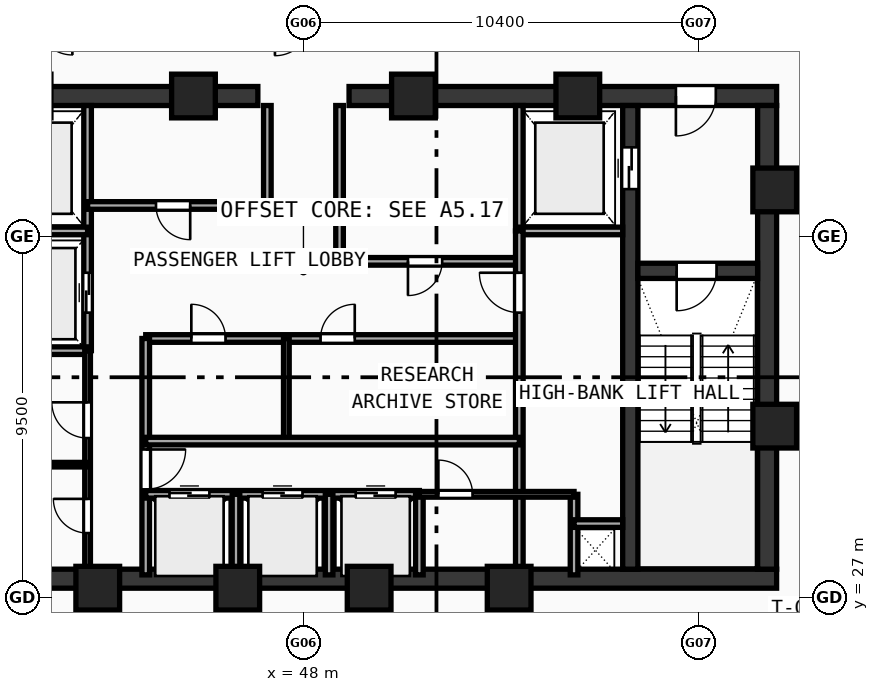
"""IFC4 building model, lengths in metres.
Left out: names, types, materials, properties, quantities, classifications, styles, units other than length and angle.
Written with IfcOpenShell. Run it as: python <this file> out.ifc"""

import sys

from ifc_helpers import new_model, si_unit, direction, frame, frame_2d, origin, origin_with_axes, origin_2d, place, context, subcontext, project, spatial, rectangle, hollow_rectangle, extrude, source, transform, mapped, element, fill, save


model = new_model("IFC4")
c1 = context("Model", 3, precision=1e-05, world=origin(), true_north=direction((0.0, 1.0)))
c2 = subcontext(c1, "Body", "Model", "MODEL_VIEW")
j1 = project(units=[si_unit("LENGTHUNIT", "METRE"), si_unit("PLANEANGLEUNIT", "RADIAN")], contexts=[c1])
p1 = place(None, origin())
s1 = spatial("IfcSite", under=j1, at=p1, CompositionType="ELEMENT")
p2 = place(p1, origin())
s2 = spatial("IfcBuilding", under=s1, at=p2, CompositionType="ELEMENT")
p3 = place(p2, frame((0.0, 0.0, 263.18)))
s3 = spatial("IfcBuildingStorey", under=s2, at=p3, CompositionType="ELEMENT", Elevation=263.18)
p4 = place(p3, frame((35.55, 27.5, 0.0), z_axis=(0.0, 0.0, 1.0), x_axis=(1.0, 0.0, 0.0)))
e1 = element("IfcWall", 1, at=p4, inside=s3, PredefinedType="SHEAR", context=c2, shape_type="SweptSolid", body=[
    extrude(rectangle(XDim=24.9, YDim=0.5, at=frame_2d((12.45, 0.0))), origin(), (0.0, 0.0, 1.0), 3.47),
])
p5 = place(p3, frame((35.55, 40.2, 0.0), z_axis=(0.0, 0.0, 1.0), x_axis=(1.0, 0.0, 0.0)))
e2 = element("IfcWall", 2, at=p5, inside=s3, PredefinedType="SHEAR", context=c2, shape_type="SweptSolid", body=[
    extrude(rectangle(XDim=11.25, YDim=0.5, at=frame_2d((5.625, 0.0))), origin(), (0.0, 0.0, 1.0), 3.47),
])
p6 = place(p5, frame((1.6, 0.0, 0.0)))
e3 = element("IfcOpeningElement", 3, at=p6, cuts=e2, PredefinedType="OPENING", context=c2, shape_type="SweptSolid", body=[
    extrude(rectangle(XDim=1.05, YDim=2.1, at=frame_2d((0.525, 1.05))), frame((0.0, 0.26, 0.0), z_axis=(0.0, -1.0, 0.0), x_axis=(1.0, 0.0, 0.0)), (0.0, 0.0, 1.0), 0.52),
])
p7 = place(p3, frame((49.2, 40.2, 0.0), z_axis=(0.0, 0.0, 1.0), x_axis=(1.0, 0.0, 0.0)))
e4 = element("IfcWall", 4, at=p7, inside=s3, PredefinedType="SHEAR", context=c2, shape_type="SweptSolid", body=[
    extrude(rectangle(XDim=11.25, YDim=0.5, at=frame_2d((5.625, 0.0))), origin(), (0.0, 0.0, 1.0), 3.47),
])
p8 = place(p7, frame((8.6, 0.0, 0.0)))
e5 = element("IfcOpeningElement", 5, at=p8, cuts=e4, PredefinedType="OPENING", context=c2, shape_type="SweptSolid", body=[
    extrude(rectangle(XDim=1.05, YDim=2.1, at=frame_2d((0.525, 1.05))), frame((0.0, 0.26, 0.0), z_axis=(0.0, -1.0, 0.0), x_axis=(1.0, 0.0, 0.0)), (0.0, 0.0, 1.0), 0.52),
])
p9 = place(p3, frame((60.2, 27.75, 0.0), z_axis=(0.0, 0.0, 1.0), x_axis=(0.0, 1.0, 0.0)))
e6 = element("IfcWall", 6, at=p9, inside=s3, PredefinedType="SHEAR", context=c2, shape_type="SweptSolid", body=[
    extrude(rectangle(XDim=12.2, YDim=0.5, at=frame_2d((6.1, 0.0))), origin(), (0.0, 0.0, 1.0), 3.47),
])
p10 = place(p3, frame((56.6, 27.75, 0.0), z_axis=(0.0, 0.0, 1.0), x_axis=(0.0, 1.0, 0.0)))
e7 = element("IfcWall", 7, at=p10, inside=s3, PredefinedType="SHEAR", context=c2, shape_type="SweptSolid", body=[
    extrude(rectangle(XDim=12.2, YDim=0.4, at=frame_2d((6.1, 0.0))), origin(), (0.0, 0.0, 1.0), 3.47),
])
p11 = place(p10, frame((10.0, 0.0, 0.0)))
e8 = element("IfcOpeningElement", 8, at=p11, cuts=e7, PredefinedType="OPENING", context=c2, shape_type="SweptSolid", body=[
    extrude(rectangle(XDim=1.1, YDim=2.1, at=frame_2d((0.55, 1.05))), frame((0.0, 0.21, 0.0), z_axis=(0.0, -1.0, 0.0), x_axis=(1.0, 0.0, 0.0)), (0.0, 0.0, 1.0), 0.42),
])
p12 = place(p3, frame((56.8, 35.6, 0.0), z_axis=(0.0, 0.0, 1.0), x_axis=(1.0, 0.0, 0.0)))
e9 = element("IfcWall", 9, at=p12, inside=s3, PredefinedType="SHEAR", context=c2, shape_type="SweptSolid", body=[
    extrude(rectangle(XDim=3.15, YDim=0.4, at=frame_2d((1.575, 0.0))), origin(), (0.0, 0.0, 1.0), 3.47),
])
p13 = place(p12, frame((1.02, 0.0, 0.0)))
e10 = element("IfcOpeningElement", 10, at=p13, cuts=e9, PredefinedType="OPENING", context=c2, shape_type="SweptSolid", body=[
    extrude(rectangle(XDim=1.05, YDim=2.1, at=frame_2d((0.525, 1.05))), frame((0.0, 0.21, 0.0), z_axis=(0.0, -1.0, 0.0), x_axis=(1.0, 0.0, 0.0)), (0.0, 0.0, 1.0), 0.42),
])
m1 = source(origin(), c2, "Body", "SweptSolid", [
    extrude(hollow_rectangle(XDim=1.15, YDim=1.15, WallThickness=0.048, at=origin_2d()), origin(), (0.0, 0.0, 1.0), 3.73),
])
for number, where, z_axis, x_axis in (
    (11, (42.588, 27.25, -0.26), (0.0, 0.0, 1.0), (1.0, 0.0, 0.0)),
    (12, (46.272, 27.25, -0.26), (0.0, 0.0, 1.0), (1.0, 0.0, 0.0)),
    (13, (49.729, 27.25, -0.26), (0.0, 0.0, 1.0), (1.0, 0.0, 0.0)),
    (14, (53.412, 27.25, -0.26), (0.0, 0.0, 1.0), (1.0, 0.0, 0.0)),
    (15, (60.4, 31.513, -0.26), (0.0, 0.0, 1.0), (1.0, 0.0, 0.0)),
    (16, (60.4, 37.729, -0.26), (0.0, 0.0, 1.0), (1.0, 0.0, 0.0)),
    (17, (55.219, 40.2, -0.26), (0.0, 0.0, 1.0), (1.0, 0.0, 0.0)),
    (18, (50.894, 40.2, -0.26), (0.0, 0.0, 1.0), (1.0, 0.0, 0.0)),
    (19, (45.106, 40.2, -0.26), (0.0, 0.0, 1.0), (1.0, 0.0, 0.0)),
):
    element("IfcColumn", number, at=place(p3, frame(where, z_axis=z_axis, x_axis=x_axis)), inside=s3, PredefinedType="COLUMN", context=c2, shape_type="MappedRepresentation", body=[
        mapped(m1, transform((0.0, 0.0, 0.0), scale=1.0)),
    ])
p14 = place(p3, frame((42.32, 33.5, 0.0), z_axis=(0.0, 0.0, 1.0), x_axis=(0.0, 1.0, 0.0)))
e20 = element("IfcWall", 20, at=p14, inside=s3, PredefinedType="SOLIDWALL", context=c2, shape_type="SweptSolid", body=[
    extrude(rectangle(XDim=6.45, YDim=0.2, at=frame_2d((3.225, 0.0))), origin(), (0.0, 0.0, 1.0), 3.47),
])
p15 = place(p14, frame((1.0, 0.0, 0.0)))
e21 = element("IfcOpeningElement", 21, at=p15, cuts=e20, PredefinedType="OPENING", context=c2, shape_type="SweptSolid", body=[
    extrude(rectangle(XDim=1.05, YDim=2.1, at=frame_2d((0.525, 1.05))), frame((0.0, 0.11, 0.0), z_axis=(0.0, -1.0, 0.0), x_axis=(1.0, 0.0, 0.0)), (0.0, 0.0, 1.0), 0.22),
])
for number, where, z_axis, x_axis in (
    (22, (39.6, 36.65, 0.0), (0.0, 0.0, 1.0), (1.0, 0.0, 0.0)),
    (23, (39.6, 33.5, 0.0), (0.0, 0.0, 1.0), (1.0, 0.0, 0.0)),
):
    element("IfcWall", number, at=place(p3, frame(where, z_axis=z_axis, x_axis=x_axis)), inside=s3, PredefinedType="SOLIDWALL", context=c2, shape_type="SweptSolid", body=[
        extrude(rectangle(XDim=2.72, YDim=0.2, at=frame_2d((1.36, 0.0))), origin(), (0.0, 0.0, 1.0), 3.47),
    ])
p16 = place(p3, frame((53.68, 36.65, 0.0), z_axis=(0.0, 0.0, 1.0), x_axis=(0.0, 1.0, 0.0)))
e24 = element("IfcWall", 24, at=p16, inside=s3, PredefinedType="SOLIDWALL", context=c2, shape_type="SweptSolid", body=[
    extrude(rectangle(XDim=3.3, YDim=0.2, at=frame_2d((1.65, 0.0))), origin(), (0.0, 0.0, 1.0), 3.47),
])
p17 = place(p3, frame((53.68, 36.65, 0.0), z_axis=(0.0, 0.0, 1.0), x_axis=(1.0, 0.0, 0.0)))
e25 = element("IfcWall", 25, at=p17, inside=s3, PredefinedType="SOLIDWALL", context=c2, shape_type="SweptSolid", body=[
    extrude(rectangle(XDim=2.72, YDim=0.2, at=frame_2d((1.36, 0.0))), origin(), (0.0, 0.0, 1.0), 3.47),
])
p18 = place(p3, frame((42.32, 37.32, 0.0), z_axis=(0.0, 0.0, 1.0), x_axis=(1.0, 0.0, 0.0)))
e26 = element("IfcWall", 26, at=p18, inside=s3, PredefinedType="SOLIDWALL", context=c2, shape_type="SweptSolid", body=[
    extrude(rectangle(XDim=4.73, YDim=0.2, at=frame_2d((2.365, 0.0))), origin(), (0.0, 0.0, 1.0), 3.47),
])
p19 = place(p18, frame((1.8, 0.0, 0.0)))
e27 = element("IfcOpeningElement", 27, at=p19, cuts=e26, PredefinedType="OPENING", context=c2, shape_type="SweptSolid", body=[
    extrude(rectangle(XDim=0.9, YDim=2.1, at=frame_2d((0.45, 1.05))), frame((0.0, 0.11, 0.0), z_axis=(0.0, -1.0, 0.0), x_axis=(1.0, 0.0, 0.0)), (0.0, 0.0, 1.0), 0.22),
])
p20 = place(p3, frame((48.95, 35.85, 0.0), z_axis=(0.0, 0.0, 1.0), x_axis=(1.0, 0.0, 0.0)))
e28 = element("IfcWall", 28, at=p20, inside=s3, PredefinedType="SOLIDWALL", context=c2, shape_type="SweptSolid", body=[
    extrude(rectangle(XDim=4.73, YDim=0.2, at=frame_2d((2.365, 0.0))), origin(), (0.0, 0.0, 1.0), 3.47),
])
p21 = place(p20, frame((1.8, 0.0, 0.0)))
e29 = element("IfcOpeningElement", 29, at=p21, cuts=e28, PredefinedType="OPENING", context=c2, shape_type="SweptSolid", body=[
    extrude(rectangle(XDim=0.9, YDim=2.1, at=frame_2d((0.45, 1.05))), frame((0.0, 0.11, 0.0), z_axis=(0.0, -1.0, 0.0), x_axis=(1.0, 0.0, 0.0)), (0.0, 0.0, 1.0), 0.22),
])
p22 = place(p3, frame((47.05, 37.32, 0.0), z_axis=(0.0, 0.0, 1.0), x_axis=(0.0, 1.0, 0.0)))
e30 = element("IfcWall", 30, at=p22, inside=s3, PredefinedType="SOLIDWALL", context=c2, shape_type="SweptSolid", body=[
    extrude(rectangle(XDim=2.63, YDim=0.2, at=frame_2d((1.315, 0.0))), origin(), (0.0, 0.0, 1.0), 3.47),
])
p23 = place(p3, frame((48.95, 35.85, 0.0), z_axis=(0.0, 0.0, 1.0), x_axis=(0.0, 1.0, 0.0)))
e31 = element("IfcWall", 31, at=p23, inside=s3, PredefinedType="SOLIDWALL", context=c2, shape_type="SweptSolid", body=[
    extrude(rectangle(XDim=4.1, YDim=0.2, at=frame_2d((2.05, 0.0))), origin(), (0.0, 0.0, 1.0), 3.47),
])
p24 = place(p3, frame((43.85, 33.82, 0.0), z_axis=(0.0, 0.0, 1.0), x_axis=(1.0, 0.0, 0.0)))
e32 = element("IfcWall", 32, at=p24, inside=s3, PredefinedType="SOLIDWALL", context=c2, shape_type="SweptSolid", body=[
    extrude(rectangle(XDim=9.83, YDim=0.2, at=frame_2d((4.915, 0.0))), origin(), (0.0, 0.0, 1.0), 3.47),
])
p25 = place(p24, frame((1.2, 0.0, 0.0)))
e33 = element("IfcOpeningElement", 33, at=p25, cuts=e32, PredefinedType="OPENING", context=c2, shape_type="SweptSolid", body=[
    extrude(rectangle(XDim=0.9, YDim=2.1, at=frame_2d((0.45, 1.05))), frame((0.0, 0.11, 0.0), z_axis=(0.0, -1.0, 0.0), x_axis=(1.0, 0.0, 0.0)), (0.0, 0.0, 1.0), 0.22),
])
p26 = place(p24, frame((4.6, 0.0, 0.0)))
e34 = element("IfcOpeningElement", 34, at=p26, cuts=e32, PredefinedType="OPENING", context=c2, shape_type="SweptSolid", body=[
    extrude(rectangle(XDim=0.9, YDim=2.1, at=frame_2d((0.45, 1.05))), frame((0.0, 0.11, 0.0), z_axis=(0.0, -1.0, 0.0), x_axis=(1.0, 0.0, 0.0)), (0.0, 0.0, 1.0), 0.22),
])
p27 = place(p3, frame((43.85, 27.6, 0.0), z_axis=(0.0, 0.0, 1.0), x_axis=(0.0, 1.0, 0.0)))
e35 = element("IfcWall", 35, at=p27, inside=s3, PredefinedType="SOLIDWALL", context=c2, shape_type="SweptSolid", body=[
    extrude(rectangle(XDim=6.22, YDim=0.2, at=frame_2d((3.11, 0.0))), origin(), (0.0, 0.0, 1.0), 3.47),
])
p28 = place(p27, frame((2.25, 0.0, 0.0)))
e36 = element("IfcOpeningElement", 36, at=p28, cuts=e35, PredefinedType="OPENING", context=c2, shape_type="SweptSolid", body=[
    extrude(rectangle(XDim=1.05, YDim=2.1, at=frame_2d((0.525, 1.05))), frame((0.0, 0.11, 0.0), z_axis=(0.0, -1.0, 0.0), x_axis=(1.0, 0.0, 0.0)), (0.0, 0.0, 1.0), 0.22),
])
p29 = place(p3, frame((53.68, 27.6, 0.0), z_axis=(0.0, 0.0, 1.0), x_axis=(0.0, 1.0, 0.0)))
e37 = element("IfcWall", 37, at=p29, inside=s3, PredefinedType="SOLIDWALL", context=c2, shape_type="SweptSolid", body=[
    extrude(rectangle(XDim=9.05, YDim=0.2, at=frame_2d((4.525, 0.0))), origin(), (0.0, 0.0, 1.0), 3.47),
])
p30 = place(p29, frame((6.9, 0.0, 0.0)))
e38 = element("IfcOpeningElement", 38, at=p30, cuts=e37, PredefinedType="OPENING", context=c2, shape_type="SweptSolid", body=[
    extrude(rectangle(XDim=1.05, YDim=2.1, at=frame_2d((0.525, 1.05))), frame((0.0, 0.11, 0.0), z_axis=(0.0, -1.0, 0.0), x_axis=(1.0, 0.0, 0.0)), (0.0, 0.0, 1.0), 0.22),
])
p31 = place(p3, frame((47.55, 31.12, 0.0), z_axis=(0.0, 0.0, 1.0), x_axis=(0.0, 1.0, 0.0)))
e39 = element("IfcWall", 39, at=p31, inside=s3, PredefinedType="PARTITIONING", context=c2, shape_type="SweptSolid", body=[
    extrude(rectangle(XDim=2.7, YDim=0.15, at=frame_2d((1.35, 0.0))), origin(), (0.0, 0.0, 1.0), 3.47),
])
p32 = place(p3, frame((43.85, 29.72, 0.0), z_axis=(0.0, 0.0, 1.0), x_axis=(1.0, 0.0, 0.0)))
e40 = element("IfcWall", 40, at=p32, inside=s3, PredefinedType="SOLIDWALL", context=c2, shape_type="SweptSolid", body=[
    extrude(rectangle(XDim=7.2, YDim=0.2, at=frame_2d((3.6, 0.0))), origin(), (0.0, 0.0, 1.0), 3.47),
])
p33 = place(p32, frame((0.625, 0.0, 0.0)))
e41 = element("IfcOpeningElement", 41, at=p33, cuts=e40, PredefinedType="OPENING", context=c2, shape_type="SweptSolid", body=[
    extrude(rectangle(XDim=1.05, YDim=2.1, at=frame_2d((0.525, 1.05))), frame((0.0, 0.11, 0.0), z_axis=(0.0, -1.0, 0.0), x_axis=(1.0, 0.0, 0.0)), (0.0, 0.0, 1.0), 0.22),
])
p34 = place(p32, frame((3.075, 0.0, 0.0)))
e42 = element("IfcOpeningElement", 42, at=p34, cuts=e40, PredefinedType="OPENING", context=c2, shape_type="SweptSolid", body=[
    extrude(rectangle(XDim=1.05, YDim=2.1, at=frame_2d((0.525, 1.05))), frame((0.0, 0.11, 0.0), z_axis=(0.0, -1.0, 0.0), x_axis=(1.0, 0.0, 0.0)), (0.0, 0.0, 1.0), 0.22),
])
p35 = place(p32, frame((5.525, 0.0, 0.0)))
e43 = element("IfcOpeningElement", 43, at=p35, cuts=e40, PredefinedType="OPENING", context=c2, shape_type="SweptSolid", body=[
    extrude(rectangle(XDim=1.05, YDim=2.1, at=frame_2d((0.525, 1.05))), frame((0.0, 0.11, 0.0), z_axis=(0.0, -1.0, 0.0), x_axis=(1.0, 0.0, 0.0)), (0.0, 0.0, 1.0), 0.22),
])
p36 = place(p3, frame((51.05, 27.6, 0.0), z_axis=(0.0, 0.0, 1.0), x_axis=(0.0, 1.0, 0.0)))
e44 = element("IfcWall", 44, at=p36, inside=s3, PredefinedType="SOLIDWALL", context=c2, shape_type="SweptSolid", body=[
    extrude(rectangle(XDim=2.12, YDim=0.2, at=frame_2d((1.06, 0.0))), origin(), (0.0, 0.0, 1.0), 3.47),
])
p37 = place(p3, frame((43.85, 31.12, 0.0), z_axis=(0.0, 0.0, 1.0), x_axis=(1.0, 0.0, 0.0)))
e45 = element("IfcWall", 45, at=p37, inside=s3, PredefinedType="SOLIDWALL", context=c2, shape_type="SweptSolid", body=[
    extrude(rectangle(XDim=9.83, YDim=0.2, at=frame_2d((4.915, 0.0))), origin(), (0.0, 0.0, 1.0), 3.47),
])
for number, where, z_axis, x_axis in (
    (46, (46.225, 27.6, 0.0), (0.0, 0.0, 1.0), (0.0, 1.0, 0.0)),
    (47, (48.675, 27.6, 0.0), (0.0, 0.0, 1.0), (0.0, 1.0, 0.0)),
    (48, (55.12, 27.6, 0.0), (0.0, 0.0, 1.0), (0.0, 1.0, 0.0)),
):
    element("IfcWall", number, at=place(p3, frame(where, z_axis=z_axis, x_axis=x_axis)), inside=s3, PredefinedType="SOLIDWALL", context=c2, shape_type="SweptSolid", body=[
        extrude(rectangle(XDim=2.12, YDim=0.2, at=frame_2d((1.06, 0.0))), origin(), (0.0, 0.0, 1.0), 3.47),
    ])
p38 = place(p3, frame((55.12, 28.95, 0.0), z_axis=(0.0, 0.0, 1.0), x_axis=(1.0, 0.0, 0.0)))
e49 = element("IfcWall", 49, at=p38, inside=s3, PredefinedType="SOLIDWALL", context=c2, shape_type="SweptSolid", body=[
    extrude(rectangle(XDim=1.28, YDim=0.2, at=frame_2d((0.64, 0.0))), origin(), (0.0, 0.0, 1.0), 3.47),
])
p39 = place(p3, frame((42.32, 27.6, 0.0), z_axis=(0.0, 0.0, 1.0), x_axis=(0.0, 1.0, 0.0)))
e50 = element("IfcWall", 50, at=p39, inside=s3, PredefinedType="PARTITIONING", context=c2, shape_type="SweptSolid", body=[
    extrude(rectangle(XDim=5.9, YDim=0.15, at=frame_2d((2.95, 0.0))), origin(), (0.0, 0.0, 1.0), 3.47),
])
p40 = place(p39, frame((1.1, 0.0, 0.0)))
e51 = element("IfcOpeningElement", 51, at=p40, cuts=e50, PredefinedType="OPENING", context=c2, shape_type="SweptSolid", body=[
    extrude(rectangle(XDim=0.9, YDim=2.1, at=frame_2d((0.45, 1.05))), frame((0.0, 0.085, 0.0), z_axis=(0.0, -1.0, 0.0), x_axis=(1.0, 0.0, 0.0)), (0.0, 0.0, 1.0), 0.17),
])
p41 = place(p39, frame((3.6, 0.0, 0.0)))
e52 = element("IfcOpeningElement", 52, at=p41, cuts=e50, PredefinedType="OPENING", context=c2, shape_type="SweptSolid", body=[
    extrude(rectangle(XDim=0.94, YDim=2.1, at=frame_2d((0.47, 1.05))), frame((0.0, 0.085, 0.0), z_axis=(0.0, -1.0, 0.0), x_axis=(1.0, 0.0, 0.0)), (0.0, 0.0, 1.0), 0.17),
])
p42 = place(p3, frame((51.05, 29.72, 0.0), z_axis=(0.0, 0.0, 1.0), x_axis=(1.0, 0.0, 0.0)))
e53 = element("IfcWall", 53, at=p42, inside=s3, PredefinedType="PARTITIONING", context=c2, shape_type="SweptSolid", body=[
    extrude(rectangle(XDim=4.07, YDim=0.15, at=frame_2d((2.035, 0.0))), origin(), (0.0, 0.0, 1.0), 3.47),
])
p43 = place(p42, frame((0.5, 0.0, 0.0)))
e54 = element("IfcOpeningElement", 54, at=p43, cuts=e53, PredefinedType="OPENING", context=c2, shape_type="SweptSolid", body=[
    extrude(rectangle(XDim=0.9, YDim=2.1, at=frame_2d((0.45, 1.05))), frame((0.0, 0.085, 0.0), z_axis=(0.0, -1.0, 0.0), x_axis=(1.0, 0.0, 0.0)), (0.0, 0.0, 1.0), 0.17),
])
p44 = place(p3, frame((39.6, 30.5, 0.0), z_axis=(0.0, 0.0, 1.0), x_axis=(1.0, 0.0, 0.0)))
e55 = element("IfcWall", 55, at=p44, inside=s3, PredefinedType="PARTITIONING", context=c2, shape_type="SweptSolid", body=[
    extrude(rectangle(XDim=2.72, YDim=0.12, at=frame_2d((1.36, 0.0))), origin(), (0.0, 0.0, 1.0), 3.47),
])
m2 = source(origin(), c2, "Body", "SweptSolid", [
    extrude(rectangle(XDim=1.05, YDim=2.1, at=frame_2d((0.525, 1.05))), frame((0.0, 0.025, 0.0), z_axis=(0.0, -1.0, 0.0), x_axis=(1.0, 0.0, 0.0)), (0.0, 0.0, 1.0), 0.05),
])
p45 = place(p13, frame((1.05, 0.0, 0.0), z_axis=(0.0, 0.0, 1.0), x_axis=(-1.0, 0.0, 0.0)))
e56 = element("IfcDoor", 56, at=p45, inside=s3, OperationType="SINGLE_SWING_RIGHT", PredefinedType="DOOR", context=c2, shape_type="MappedRepresentation", body=[
    mapped(m2, transform((0.0, 0.0, 0.0), scale=1.0)),
])
fill(e10, e56)
p46 = place(p8, frame((1.05, 0.0, 0.0), z_axis=(0.0, 0.0, 1.0), x_axis=(-1.0, 0.0, 0.0)))
e57 = element("IfcDoor", 57, at=p46, inside=s3, OperationType="SINGLE_SWING_RIGHT", PredefinedType="DOOR", context=c2, shape_type="MappedRepresentation", body=[
    mapped(m2, transform((0.0, 0.0, 0.0), scale=1.0)),
])
fill(e5, e57)
m3 = source(origin(), c2, "Body", "SweptSolid", [
    extrude(rectangle(XDim=1.1, YDim=2.1, at=frame_2d((0.55, 1.05))), frame((0.0, 0.025, 0.0), z_axis=(0.0, -1.0, 0.0), x_axis=(1.0, 0.0, 0.0)), (0.0, 0.0, 1.0), 0.05),
])
p47 = place(p11, origin_with_axes())
e58 = element("IfcDoor", 58, at=p47, inside=s3, OperationType="DOUBLE_DOOR_SLIDING", PredefinedType="DOOR", context=c2, shape_type="MappedRepresentation", body=[
    mapped(m3, transform((0.0, 0.0, 0.0), scale=1.0)),
])
fill(e8, e58)
p48 = place(p15, origin_with_axes())
e59 = element("IfcDoor", 59, at=p48, inside=s3, OperationType="DOUBLE_DOOR_SLIDING", PredefinedType="DOOR", context=c2, shape_type="MappedRepresentation", body=[
    mapped(m2, transform((0.0, 0.0, 0.0), scale=1.0)),
])
fill(e21, e59)
m4 = source(origin(), c2, "Body", "SweptSolid", [
    extrude(rectangle(XDim=0.9, YDim=2.1, at=frame_2d((0.45, 1.05))), frame((0.0, 0.025, 0.0), z_axis=(0.0, -1.0, 0.0), x_axis=(1.0, 0.0, 0.0)), (0.0, 0.0, 1.0), 0.05),
])
p49 = place(p19, frame((0.9, 0.0, 0.0), z_axis=(0.0, 0.0, 1.0), x_axis=(-1.0, 0.0, 0.0)))
e60 = element("IfcDoor", 60, at=p49, inside=s3, OperationType="SINGLE_SWING_LEFT", PredefinedType="DOOR", context=c2, shape_type="MappedRepresentation", body=[
    mapped(m4, transform((0.0, 0.0, 0.0), scale=1.0)),
])
fill(e27, e60)
p50 = place(p21, frame((0.9, 0.0, 0.0), z_axis=(0.0, 0.0, 1.0), x_axis=(-1.0, 0.0, 0.0)))
e61 = element("IfcDoor", 61, at=p50, inside=s3, OperationType="SINGLE_SWING_RIGHT", PredefinedType="DOOR", context=c2, shape_type="MappedRepresentation", body=[
    mapped(m4, transform((0.0, 0.0, 0.0), scale=1.0)),
])
fill(e29, e61)
p51 = place(p25, origin_with_axes())
e62 = element("IfcDoor", 62, at=p51, inside=s3, OperationType="SINGLE_SWING_LEFT", PredefinedType="DOOR", context=c2, shape_type="MappedRepresentation", body=[
    mapped(m4, transform((0.0, 0.0, 0.0), scale=1.0)),
])
fill(e33, e62)
p52 = place(p26, origin_with_axes())
e63 = element("IfcDoor", 63, at=p52, inside=s3, OperationType="SINGLE_SWING_RIGHT", PredefinedType="DOOR", context=c2, shape_type="MappedRepresentation", body=[
    mapped(m4, transform((0.0, 0.0, 0.0), scale=1.0)),
])
fill(e34, e63)
p53 = place(p28, frame((1.05, 0.0, 0.0), z_axis=(0.0, 0.0, 1.0), x_axis=(-1.0, 0.0, 0.0)))
e64 = element("IfcDoor", 64, at=p53, inside=s3, OperationType="SINGLE_SWING_LEFT", PredefinedType="DOOR", context=c2, shape_type="MappedRepresentation", body=[
    mapped(m2, transform((0.0, 0.0, 0.0), scale=1.0)),
])
fill(e36, e64)
p54 = place(p30, origin_with_axes())
e65 = element("IfcDoor", 65, at=p54, inside=s3, OperationType="SINGLE_SWING_RIGHT", PredefinedType="DOOR", context=c2, shape_type="MappedRepresentation", body=[
    mapped(m2, transform((0.0, 0.0, 0.0), scale=1.0)),
])
fill(e38, e65)
p55 = place(p33, origin_with_axes())
e66 = element("IfcDoor", 66, at=p55, inside=s3, OperationType="DOUBLE_DOOR_SLIDING", PredefinedType="DOOR", context=c2, shape_type="MappedRepresentation", body=[
    mapped(m2, transform((0.0, 0.0, 0.0), scale=1.0)),
])
fill(e41, e66)
p56 = place(p34, origin_with_axes())
e67 = element("IfcDoor", 67, at=p56, inside=s3, OperationType="DOUBLE_DOOR_SLIDING", PredefinedType="DOOR", context=c2, shape_type="MappedRepresentation", body=[
    mapped(m2, transform((0.0, 0.0, 0.0), scale=1.0)),
])
fill(e42, e67)
p57 = place(p35, origin_with_axes())
e68 = element("IfcDoor", 68, at=p57, inside=s3, OperationType="DOUBLE_DOOR_SLIDING", PredefinedType="DOOR", context=c2, shape_type="MappedRepresentation", body=[
    mapped(m2, transform((0.0, 0.0, 0.0), scale=1.0)),
])
fill(e43, e68)
p58 = place(p40, origin_with_axes())
e69 = element("IfcDoor", 69, at=p58, inside=s3, OperationType="SINGLE_SWING_RIGHT", PredefinedType="DOOR", context=c2, shape_type="MappedRepresentation", body=[
    mapped(m4, transform((0.0, 0.0, 0.0), scale=1.0)),
])
fill(e51, e69)
m5 = source(origin(), c2, "Body", "SweptSolid", [
    extrude(rectangle(XDim=0.94, YDim=2.1, at=frame_2d((0.47, 1.05))), frame((0.0, 0.025, 0.0), z_axis=(0.0, -1.0, 0.0), x_axis=(1.0, 0.0, 0.0)), (0.0, 0.0, 1.0), 0.05),
])
p59 = place(p41, origin_with_axes())
e70 = element("IfcDoor", 70, at=p59, inside=s3, OperationType="SINGLE_SWING_RIGHT", PredefinedType="DOOR", context=c2, shape_type="MappedRepresentation", body=[
    mapped(m5, transform((0.0, 0.0, 0.0), scale=1.0)),
])
fill(e52, e70)
p60 = place(p43, origin_with_axes())
e71 = element("IfcDoor", 71, at=p60, inside=s3, OperationType="SINGLE_SWING_LEFT", PredefinedType="DOOR", context=c2, shape_type="MappedRepresentation", body=[
    mapped(m4, transform((0.0, 0.0, 0.0), scale=1.0)),
])
fill(e54, e71)
save(model, sys.argv[1])
